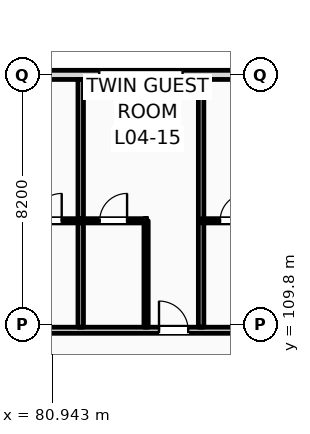
"""IFC4 building model, lengths in metres.
Left out: names, types, materials, properties, quantities, classifications, styles, units other than length and angle.
Written with IfcOpenShell. Run it as: python <this file> out.ifc"""

import sys

from ifc_helpers import new_model, si_unit, direction, frame, frame_2d, origin, place, context, subcontext, project, spatial, rectangle, extrude, element, fill, save


model = new_model("IFC4")
c1 = context("Model", 3, precision=1e-05, world=origin(), true_north=direction((0.0, 1.0)))
c2 = subcontext(c1, "Body", "Model", "MODEL_VIEW")
j1 = project(units=[si_unit("LENGTHUNIT", "METRE"), si_unit("PLANEANGLEUNIT", "RADIAN")], contexts=[c1])
p1 = place(None, origin())
s1 = spatial("IfcSite", under=j1, at=p1, CompositionType="ELEMENT")
p2 = place(p1, origin())
s2 = spatial("IfcBuilding", under=s1, at=p2, CompositionType="ELEMENT")
p3 = place(p2, frame((0.0, 0.0, 20.4)))
s3 = spatial("IfcBuildingStorey", under=s2, at=p3, CompositionType="ELEMENT", Elevation=20.4)
p4 = place(p3, frame((22.5, 118.0, 0.0), z_axis=(0.0, 0.0, 1.0), x_axis=(1.0, 0.0, 0.0)))
e1 = element("IfcWall", 1, at=p4, inside=s3, PredefinedType="STANDARD", context=c2, shape_type="SweptSolid", body=[
    extrude(rectangle(XDim=97.5, YDim=0.3, at=frame_2d((48.75, 0.0))), origin(), (0.0, 0.0, 1.0), 3.38),
])
p5 = place(p4, frame((0.91, 0.0, 0.9)))
e2 = element("IfcOpeningElement", 2, at=p5, cuts=e1, PredefinedType="OPENING", context=c2, shape_type="SweptSolid", body=[
    extrude(rectangle(XDim=0.9, YDim=1.8, at=frame_2d((0.45, 0.9))), frame((0.0, 0.16, 0.0), z_axis=(0.0, -1.0, 0.0), x_axis=(1.0, 0.0, 0.0)), (0.0, 0.0, 1.0), 0.32),
])
p6 = place(p4, frame((6.36, 0.0, 0.0)))
e3 = element("IfcOpeningElement", 3, at=p6, cuts=e1, PredefinedType="OPENING", context=c2, shape_type="SweptSolid", body=[
    extrude(rectangle(XDim=1.2, YDim=2.25, at=frame_2d((0.6, 1.125))), frame((0.0, 0.16, 0.0), z_axis=(0.0, -1.0, 0.0), x_axis=(1.0, 0.0, 0.0)), (0.0, 0.0, 1.0), 0.32),
])
p7 = place(p4, frame((11.41, 0.0, 0.9)))
e4 = element("IfcOpeningElement", 4, at=p7, cuts=e1, PredefinedType="OPENING", context=c2, shape_type="SweptSolid", body=[
    extrude(rectangle(XDim=1.1, YDim=1.9, at=frame_2d((0.55, 0.95))), frame((0.0, 0.16, 0.0), z_axis=(0.0, -1.0, 0.0), x_axis=(1.0, 0.0, 0.0)), (0.0, 0.0, 1.0), 0.32),
])
p8 = place(p4, frame((14.335, 0.0, 0.9)))
e5 = element("IfcOpeningElement", 5, at=p8, cuts=e1, PredefinedType="OPENING", context=c2, shape_type="SweptSolid", body=[
    extrude(rectangle(XDim=1.65, YDim=1.95, at=frame_2d((0.825, 0.975))), frame((0.0, 0.16, 0.0), z_axis=(0.0, -1.0, 0.0), x_axis=(1.0, 0.0, 0.0)), (0.0, 0.0, 1.0), 0.32),
])
p9 = place(p4, frame((19.26, 0.0, 0.9)))
e6 = element("IfcOpeningElement", 6, at=p9, cuts=e1, PredefinedType="OPENING", context=c2, shape_type="SweptSolid", body=[
    extrude(rectangle(XDim=1.35, YDim=2.0, at=frame_2d((0.675, 1.0))), frame((0.0, 0.16, 0.0), z_axis=(0.0, -1.0, 0.0), x_axis=(1.0, 0.0, 0.0)), (0.0, 0.0, 1.0), 0.32),
])
p10 = place(p4, frame((22.8, 0.0, 0.0)))
e7 = element("IfcOpeningElement", 7, at=p10, cuts=e1, PredefinedType="OPENING", context=c2, shape_type="SweptSolid", body=[
    extrude(rectangle(XDim=1.2, YDim=2.25, at=frame_2d((0.6, 1.125))), frame((0.0, 0.16, 0.0), z_axis=(0.0, -1.0, 0.0), x_axis=(1.0, 0.0, 0.0)), (0.0, 0.0, 1.0), 0.32),
])
p11 = place(p4, frame((26.91, 0.0, 0.9)))
e8 = element("IfcOpeningElement", 8, at=p11, cuts=e1, PredefinedType="OPENING", context=c2, shape_type="SweptSolid", body=[
    extrude(rectangle(XDim=2.1, YDim=2.1, at=frame_2d((1.05, 1.05))), frame((0.0, 0.16, 0.0), z_axis=(0.0, -1.0, 0.0), x_axis=(1.0, 0.0, 0.0)), (0.0, 0.0, 1.0), 0.32),
])
p12 = place(p4, frame((30.835, 0.0, 0.9)))
e9 = element("IfcOpeningElement", 9, at=p12, cuts=e1, PredefinedType="OPENING", context=c2, shape_type="SweptSolid", body=[
    extrude(rectangle(XDim=2.25, YDim=2.15, at=frame_2d((1.125, 1.075))), frame((0.0, 0.16, 0.0), z_axis=(0.0, -1.0, 0.0), x_axis=(1.0, 0.0, 0.0)), (0.0, 0.0, 1.0), 0.32),
])
p13 = place(p4, frame((34.96, 0.0, 0.9)))
e10 = element("IfcOpeningElement", 10, at=p13, cuts=e1, PredefinedType="OPENING", context=c2, shape_type="SweptSolid", body=[
    extrude(rectangle(XDim=2.4, YDim=2.2, at=frame_2d((1.2, 1.1))), frame((0.0, 0.16, 0.0), z_axis=(0.0, -1.0, 0.0), x_axis=(1.0, 0.0, 0.0)), (0.0, 0.0, 1.0), 0.32),
])
p14 = place(p4, frame((39.0, 0.0, 0.0)))
e11 = element("IfcOpeningElement", 11, at=p14, cuts=e1, PredefinedType="OPENING", context=c2, shape_type="SweptSolid", body=[
    extrude(rectangle(XDim=1.2, YDim=2.25, at=frame_2d((0.6, 1.125))), frame((0.0, 0.16, 0.0), z_axis=(0.0, -1.0, 0.0), x_axis=(1.0, 0.0, 0.0)), (0.0, 0.0, 1.0), 0.32),
])
p15 = place(p4, frame((43.21, 0.0, 0.9)))
e12 = element("IfcOpeningElement", 12, at=p15, cuts=e1, PredefinedType="OPENING", context=c2, shape_type="SweptSolid", body=[
    extrude(rectangle(XDim=2.7, YDim=2.3, at=frame_2d((1.35, 1.15))), frame((0.0, 0.16, 0.0), z_axis=(0.0, -1.0, 0.0), x_axis=(1.0, 0.0, 0.0)), (0.0, 0.0, 1.0), 0.32),
])
p16 = place(p4, frame((47.335, 0.0, 0.9)))
e13 = element("IfcOpeningElement", 13, at=p16, cuts=e1, PredefinedType="OPENING", context=c2, shape_type="SweptSolid", body=[
    extrude(rectangle(XDim=1.35, YDim=2.3, at=frame_2d((0.675, 1.15))), frame((0.0, 0.16, 0.0), z_axis=(0.0, -1.0, 0.0), x_axis=(1.0, 0.0, 0.0)), (0.0, 0.0, 1.0), 0.32),
])
p17 = place(p4, frame((52.74, 0.0, 0.0)))
e14 = element("IfcOpeningElement", 14, at=p17, cuts=e1, PredefinedType="OPENING", context=c2, shape_type="SweptSolid", body=[
    extrude(rectangle(XDim=1.2, YDim=2.25, at=frame_2d((0.6, 1.125))), frame((0.0, 0.16, 0.0), z_axis=(0.0, -1.0, 0.0), x_axis=(1.0, 0.0, 0.0)), (0.0, 0.0, 1.0), 0.32),
])
p18 = place(p4, frame((55.36, 0.0, 0.9)))
e15 = element("IfcOpeningElement", 15, at=p18, cuts=e1, PredefinedType="OPENING", context=c2, shape_type="SweptSolid", body=[
    extrude(rectangle(XDim=1.1, YDim=2.3, at=frame_2d((0.55, 1.15))), frame((0.0, 0.16, 0.0), z_axis=(0.0, -1.0, 0.0), x_axis=(1.0, 0.0, 0.0)), (0.0, 0.0, 1.0), 0.32),
])
p19 = place(p4, frame((59.99, 0.0, 0.9)))
e16 = element("IfcOpeningElement", 16, at=p19, cuts=e1, PredefinedType="OPENING", context=c2, shape_type="SweptSolid", body=[
    extrude(rectangle(XDim=2.74, YDim=2.3, at=frame_2d((1.37, 1.15))), frame((0.0, 0.16, 0.0), z_axis=(0.0, -1.0, 0.0), x_axis=(1.0, 0.0, 0.0)), (0.0, 0.0, 1.0), 0.32),
])
p20 = place(p4, frame((65.95, 0.0, 0.9)))
e17 = element("IfcOpeningElement", 17, at=p20, cuts=e1, PredefinedType="OPENING", context=c2, shape_type="SweptSolid", body=[
    extrude(rectangle(XDim=1.35, YDim=2.3, at=frame_2d((0.675, 1.15))), frame((0.0, 0.16, 0.0), z_axis=(0.0, -1.0, 0.0), x_axis=(1.0, 0.0, 0.0)), (0.0, 0.0, 1.0), 0.32),
])
p21 = place(p4, frame((69.16, 0.0, 0.0)))
e18 = element("IfcOpeningElement", 18, at=p21, cuts=e1, PredefinedType="OPENING", context=c2, shape_type="SweptSolid", body=[
    extrude(rectangle(XDim=1.2, YDim=2.25, at=frame_2d((0.6, 1.125))), frame((0.0, 0.16, 0.0), z_axis=(0.0, -1.0, 0.0), x_axis=(1.0, 0.0, 0.0)), (0.0, 0.0, 1.0), 0.32),
])
p22 = place(p4, frame((73.75, 0.0, 0.9)))
e19 = element("IfcOpeningElement", 19, at=p22, cuts=e1, PredefinedType="OPENING", context=c2, shape_type="SweptSolid", body=[
    extrude(rectangle(XDim=1.8, YDim=2.3, at=frame_2d((0.9, 1.15))), frame((0.0, 0.16, 0.0), z_axis=(0.0, -1.0, 0.0), x_axis=(1.0, 0.0, 0.0)), (0.0, 0.0, 1.0), 0.32),
])
p23 = place(p4, frame((76.79, 0.0, 0.9)))
e20 = element("IfcOpeningElement", 20, at=p23, cuts=e1, PredefinedType="OPENING", context=c2, shape_type="SweptSolid", body=[
    extrude(rectangle(XDim=2.74, YDim=2.3, at=frame_2d((1.37, 1.15))), frame((0.0, 0.16, 0.0), z_axis=(0.0, -1.0, 0.0), x_axis=(1.0, 0.0, 0.0)), (0.0, 0.0, 1.0), 0.32),
])
p24 = place(p4, frame((81.55, 0.0, 0.9)))
e21 = element("IfcOpeningElement", 21, at=p24, cuts=e1, PredefinedType="OPENING", context=c2, shape_type="SweptSolid", body=[
    extrude(rectangle(XDim=1.8, YDim=2.3, at=frame_2d((0.9, 1.15))), frame((0.0, 0.16, 0.0), z_axis=(0.0, -1.0, 0.0), x_axis=(1.0, 0.0, 0.0)), (0.0, 0.0, 1.0), 0.32),
])
p25 = place(p4, frame((86.01, 0.0, 0.9)))
e22 = element("IfcOpeningElement", 22, at=p25, cuts=e1, PredefinedType="OPENING", context=c2, shape_type="SweptSolid", body=[
    extrude(rectangle(XDim=1.1, YDim=1.5, at=frame_2d((0.55, 0.75))), frame((0.0, 0.16, 0.0), z_axis=(0.0, -1.0, 0.0), x_axis=(1.0, 0.0, 0.0)), (0.0, 0.0, 1.0), 0.32),
])
p26 = place(p4, frame((90.135, 0.0, 0.9)))
e23 = element("IfcOpeningElement", 23, at=p26, cuts=e1, PredefinedType="OPENING", context=c2, shape_type="SweptSolid", body=[
    extrude(rectangle(XDim=1.25, YDim=1.6, at=frame_2d((0.625, 0.8))), frame((0.0, 0.16, 0.0), z_axis=(0.0, -1.0, 0.0), x_axis=(1.0, 0.0, 0.0)), (0.0, 0.0, 1.0), 0.32),
])
p27 = place(p4, frame((94.34, 0.0, 0.9)))
e24 = element("IfcOpeningElement", 24, at=p27, cuts=e1, PredefinedType="OPENING", context=c2, shape_type="SweptSolid", body=[
    extrude(rectangle(XDim=1.4, YDim=1.7, at=frame_2d((0.7, 0.85))), frame((0.0, 0.16, 0.0), z_axis=(0.0, -1.0, 0.0), x_axis=(1.0, 0.0, 0.0)), (0.0, 0.0, 1.0), 0.32),
])
p28 = place(p3, frame((10.65, 109.6, 0.0), z_axis=(0.0, 0.0, 1.0), x_axis=(1.0, 0.0, 0.0)))
e25 = element("IfcWall", 25, at=p28, inside=s3, PredefinedType="PARTITIONING", context=c2, shape_type="SweptSolid", body=[
    extrude(rectangle(XDim=109.21, YDim=0.2, at=frame_2d((54.605, 0.0))), origin(), (0.0, 0.0, 1.0), 3.38),
])
p29 = place(p28, frame((12.535, 0.0, 0.0)))
e26 = element("IfcOpeningElement", 26, at=p29, cuts=e25, PredefinedType="OPENING", context=c2, shape_type="SweptSolid", body=[
    extrude(rectangle(XDim=1.02, YDim=2.2, at=frame_2d((0.51, 1.1))), frame((0.0, 0.11, 0.0), z_axis=(0.0, -1.0, 0.0), x_axis=(1.0, 0.0, 0.0)), (0.0, 0.0, 1.0), 0.22),
])
p30 = place(p28, frame((19.175, 0.0, 0.0)))
e27 = element("IfcOpeningElement", 27, at=p30, cuts=e25, PredefinedType="OPENING", context=c2, shape_type="SweptSolid", body=[
    extrude(rectangle(XDim=1.02, YDim=2.2, at=frame_2d((0.51, 1.1))), frame((0.0, 0.11, 0.0), z_axis=(0.0, -1.0, 0.0), x_axis=(1.0, 0.0, 0.0)), (0.0, 0.0, 1.0), 0.22),
])
p31 = place(p28, frame((23.375, 0.0, 0.0)))
e28 = element("IfcOpeningElement", 28, at=p31, cuts=e25, PredefinedType="OPENING", context=c2, shape_type="SweptSolid", body=[
    extrude(rectangle(XDim=1.02, YDim=2.2, at=frame_2d((0.51, 1.1))), frame((0.0, 0.11, 0.0), z_axis=(0.0, -1.0, 0.0), x_axis=(1.0, 0.0, 0.0)), (0.0, 0.0, 1.0), 0.22),
])
p32 = place(p28, frame((27.575, 0.0, 0.0)))
e29 = element("IfcOpeningElement", 29, at=p32, cuts=e25, PredefinedType="OPENING", context=c2, shape_type="SweptSolid", body=[
    extrude(rectangle(XDim=1.02, YDim=2.2, at=frame_2d((0.51, 1.1))), frame((0.0, 0.11, 0.0), z_axis=(0.0, -1.0, 0.0), x_axis=(1.0, 0.0, 0.0)), (0.0, 0.0, 1.0), 0.22),
])
p33 = place(p28, frame((31.805, 0.0, 0.0)))
e30 = element("IfcOpeningElement", 30, at=p33, cuts=e25, PredefinedType="OPENING", context=c2, shape_type="SweptSolid", body=[
    extrude(rectangle(XDim=0.96, YDim=2.2, at=frame_2d((0.48, 1.1))), frame((0.0, 0.11, 0.0), z_axis=(0.0, -1.0, 0.0), x_axis=(1.0, 0.0, 0.0)), (0.0, 0.0, 1.0), 0.22),
])
p34 = place(p28, frame((33.855, 0.0, 0.0)))
e31 = element("IfcOpeningElement", 31, at=p34, cuts=e25, PredefinedType="OPENING", context=c2, shape_type="SweptSolid", body=[
    extrude(rectangle(XDim=0.96, YDim=2.2, at=frame_2d((0.48, 1.1))), frame((0.0, 0.11, 0.0), z_axis=(0.0, -1.0, 0.0), x_axis=(1.0, 0.0, 0.0)), (0.0, 0.0, 1.0), 0.22),
])
p35 = place(p28, frame((40.205, 0.0, 0.0)))
e32 = element("IfcOpeningElement", 32, at=p35, cuts=e25, PredefinedType="OPENING", context=c2, shape_type="SweptSolid", body=[
    extrude(rectangle(XDim=0.96, YDim=2.2, at=frame_2d((0.48, 1.1))), frame((0.0, 0.11, 0.0), z_axis=(0.0, -1.0, 0.0), x_axis=(1.0, 0.0, 0.0)), (0.0, 0.0, 1.0), 0.22),
])
p36 = place(p28, frame((42.255, 0.0, 0.0)))
e33 = element("IfcOpeningElement", 33, at=p36, cuts=e25, PredefinedType="OPENING", context=c2, shape_type="SweptSolid", body=[
    extrude(rectangle(XDim=0.96, YDim=2.2, at=frame_2d((0.48, 1.1))), frame((0.0, 0.11, 0.0), z_axis=(0.0, -1.0, 0.0), x_axis=(1.0, 0.0, 0.0)), (0.0, 0.0, 1.0), 0.22),
])
p37 = place(p28, frame((48.605, 0.0, 0.0)))
e34 = element("IfcOpeningElement", 34, at=p37, cuts=e25, PredefinedType="OPENING", context=c2, shape_type="SweptSolid", body=[
    extrude(rectangle(XDim=0.96, YDim=2.2, at=frame_2d((0.48, 1.1))), frame((0.0, 0.11, 0.0), z_axis=(0.0, -1.0, 0.0), x_axis=(1.0, 0.0, 0.0)), (0.0, 0.0, 1.0), 0.22),
])
p38 = place(p28, frame((50.655, 0.0, 0.0)))
e35 = element("IfcOpeningElement", 35, at=p38, cuts=e25, PredefinedType="OPENING", context=c2, shape_type="SweptSolid", body=[
    extrude(rectangle(XDim=0.96, YDim=2.2, at=frame_2d((0.48, 1.1))), frame((0.0, 0.11, 0.0), z_axis=(0.0, -1.0, 0.0), x_axis=(1.0, 0.0, 0.0)), (0.0, 0.0, 1.0), 0.22),
])
p39 = place(p28, frame((57.005, 0.0, 0.0)))
e36 = element("IfcOpeningElement", 36, at=p39, cuts=e25, PredefinedType="OPENING", context=c2, shape_type="SweptSolid", body=[
    extrude(rectangle(XDim=0.96, YDim=2.2, at=frame_2d((0.48, 1.1))), frame((0.0, 0.11, 0.0), z_axis=(0.0, -1.0, 0.0), x_axis=(1.0, 0.0, 0.0)), (0.0, 0.0, 1.0), 0.22),
])
p40 = place(p28, frame((59.055, 0.0, 0.0)))
e37 = element("IfcOpeningElement", 37, at=p40, cuts=e25, PredefinedType="OPENING", context=c2, shape_type="SweptSolid", body=[
    extrude(rectangle(XDim=0.96, YDim=2.2, at=frame_2d((0.48, 1.1))), frame((0.0, 0.11, 0.0), z_axis=(0.0, -1.0, 0.0), x_axis=(1.0, 0.0, 0.0)), (0.0, 0.0, 1.0), 0.22),
])
p41 = place(p28, frame((65.405, 0.0, 0.0)))
e38 = element("IfcOpeningElement", 38, at=p41, cuts=e25, PredefinedType="OPENING", context=c2, shape_type="SweptSolid", body=[
    extrude(rectangle(XDim=0.96, YDim=2.2, at=frame_2d((0.48, 1.1))), frame((0.0, 0.11, 0.0), z_axis=(0.0, -1.0, 0.0), x_axis=(1.0, 0.0, 0.0)), (0.0, 0.0, 1.0), 0.22),
])
p42 = place(p28, frame((67.205, 0.0, 0.0)))
e39 = element("IfcOpeningElement", 39, at=p42, cuts=e25, PredefinedType="OPENING", context=c2, shape_type="SweptSolid", body=[
    extrude(rectangle(XDim=0.96, YDim=2.2, at=frame_2d((0.48, 1.1))), frame((0.0, 0.11, 0.0), z_axis=(0.0, -1.0, 0.0), x_axis=(1.0, 0.0, 0.0)), (0.0, 0.0, 1.0), 0.22),
])
p43 = place(p28, frame((73.805, 0.0, 0.0)))
e40 = element("IfcOpeningElement", 40, at=p43, cuts=e25, PredefinedType="OPENING", context=c2, shape_type="SweptSolid", body=[
    extrude(rectangle(XDim=0.96, YDim=2.2, at=frame_2d((0.48, 1.1))), frame((0.0, 0.11, 0.0), z_axis=(0.0, -1.0, 0.0), x_axis=(1.0, 0.0, 0.0)), (0.0, 0.0, 1.0), 0.22),
])
p44 = place(p28, frame((78.255, 0.0, 0.0)))
e41 = element("IfcOpeningElement", 41, at=p44, cuts=e25, PredefinedType="OPENING", context=c2, shape_type="SweptSolid", body=[
    extrude(rectangle(XDim=0.96, YDim=2.2, at=frame_2d((0.48, 1.1))), frame((0.0, 0.11, 0.0), z_axis=(0.0, -1.0, 0.0), x_axis=(1.0, 0.0, 0.0)), (0.0, 0.0, 1.0), 0.22),
])
p45 = place(p28, frame((82.205, 0.0, 0.0)))
e42 = element("IfcOpeningElement", 42, at=p45, cuts=e25, PredefinedType="OPENING", context=c2, shape_type="SweptSolid", body=[
    extrude(rectangle(XDim=0.96, YDim=2.2, at=frame_2d((0.48, 1.1))), frame((0.0, 0.11, 0.0), z_axis=(0.0, -1.0, 0.0), x_axis=(1.0, 0.0, 0.0)), (0.0, 0.0, 1.0), 0.22),
])
p46 = place(p28, frame((86.405, 0.0, 0.0)))
e43 = element("IfcOpeningElement", 43, at=p46, cuts=e25, PredefinedType="OPENING", context=c2, shape_type="SweptSolid", body=[
    extrude(rectangle(XDim=0.96, YDim=2.2, at=frame_2d((0.48, 1.1))), frame((0.0, 0.11, 0.0), z_axis=(0.0, -1.0, 0.0), x_axis=(1.0, 0.0, 0.0)), (0.0, 0.0, 1.0), 0.22),
])
p47 = place(p28, frame((90.605, 0.0, 0.0)))
e44 = element("IfcOpeningElement", 44, at=p47, cuts=e25, PredefinedType="OPENING", context=c2, shape_type="SweptSolid", body=[
    extrude(rectangle(XDim=0.96, YDim=2.2, at=frame_2d((0.48, 1.1))), frame((0.0, 0.11, 0.0), z_axis=(0.0, -1.0, 0.0), x_axis=(1.0, 0.0, 0.0)), (0.0, 0.0, 1.0), 0.22),
])
p48 = place(p28, frame((94.805, 0.0, 0.0)))
e45 = element("IfcOpeningElement", 45, at=p48, cuts=e25, PredefinedType="OPENING", context=c2, shape_type="SweptSolid", body=[
    extrude(rectangle(XDim=0.96, YDim=2.2, at=frame_2d((0.48, 1.1))), frame((0.0, 0.11, 0.0), z_axis=(0.0, -1.0, 0.0), x_axis=(1.0, 0.0, 0.0)), (0.0, 0.0, 1.0), 0.22),
])
p49 = place(p28, frame((99.005, 0.0, 0.0)))
e46 = element("IfcOpeningElement", 46, at=p49, cuts=e25, PredefinedType="OPENING", context=c2, shape_type="SweptSolid", body=[
    extrude(rectangle(XDim=0.96, YDim=2.2, at=frame_2d((0.48, 1.1))), frame((0.0, 0.11, 0.0), z_axis=(0.0, -1.0, 0.0), x_axis=(1.0, 0.0, 0.0)), (0.0, 0.0, 1.0), 0.22),
])
p50 = place(p28, frame((103.205, 0.0, 0.0)))
e47 = element("IfcOpeningElement", 47, at=p50, cuts=e25, PredefinedType="OPENING", context=c2, shape_type="SweptSolid", body=[
    extrude(rectangle(XDim=0.96, YDim=2.2, at=frame_2d((0.48, 1.1))), frame((0.0, 0.11, 0.0), z_axis=(0.0, -1.0, 0.0), x_axis=(1.0, 0.0, 0.0)), (0.0, 0.0, 1.0), 0.22),
])
p51 = place(p28, frame((105.335, 0.0, 0.0)))
e48 = element("IfcOpeningElement", 48, at=p51, cuts=e25, PredefinedType="OPENING", context=c2, shape_type="SweptSolid", body=[
    extrude(rectangle(XDim=0.96, YDim=2.2, at=frame_2d((0.48, 1.1))), frame((0.0, 0.11, 0.0), z_axis=(0.0, -1.0, 0.0), x_axis=(1.0, 0.0, 0.0)), (0.0, 0.0, 1.0), 0.22),
])
p52 = place(p28, frame((2.716, 0.0, 0.0)))
e49 = element("IfcOpeningElement", 49, at=p52, cuts=e25, PredefinedType="OPENING", context=c2, shape_type="SweptSolid", body=[
    extrude(rectangle(XDim=1.35, YDim=2.25, at=frame_2d((0.675, 1.125))), frame((0.0, 0.11, 0.0), z_axis=(0.0, -1.0, 0.0), x_axis=(1.0, 0.0, 0.0)), (0.0, 0.0, 1.0), 0.22),
])
p53 = place(p28, frame((6.65, 0.0, 0.0)))
e50 = element("IfcOpeningElement", 50, at=p53, cuts=e25, PredefinedType="OPENING", context=c2, shape_type="SweptSolid", body=[
    extrude(rectangle(XDim=1.35, YDim=2.25, at=frame_2d((0.675, 1.125))), frame((0.0, 0.11, 0.0), z_axis=(0.0, -1.0, 0.0), x_axis=(1.0, 0.0, 0.0)), (0.0, 0.0, 1.0), 0.22),
])
p54 = place(p28, frame((10.583, 0.0, 0.0)))
e51 = element("IfcOpeningElement", 51, at=p54, cuts=e25, PredefinedType="OPENING", context=c2, shape_type="SweptSolid", body=[
    extrude(rectangle(XDim=1.35, YDim=2.25, at=frame_2d((0.675, 1.125))), frame((0.0, 0.11, 0.0), z_axis=(0.0, -1.0, 0.0), x_axis=(1.0, 0.0, 0.0)), (0.0, 0.0, 1.0), 0.22),
])
p55 = place(p3, frame((81.88, 109.7, 0.0), z_axis=(0.0, 0.0, 1.0), x_axis=(0.0, 1.0, 0.0)))
e52 = element("IfcWall", 52, at=p55, inside=s3, PredefinedType="PARTITIONING", context=c2, shape_type="SweptSolid", body=[
    extrude(rectangle(XDim=8.15, YDim=0.18, at=frame_2d((4.075, 0.0))), origin(), (0.0, 0.0, 1.0), 3.94),
])
p56 = place(p3, frame((79.73, 113.2, 0.0), z_axis=(0.0, 0.0, 1.0), x_axis=(1.0, 0.0, 0.0)))
e53 = element("IfcWall", 53, at=p56, inside=s3, PredefinedType="PARTITIONING", context=c2, shape_type="SweptSolid", body=[
    extrude(rectangle(XDim=2.15, YDim=0.14, at=frame_2d((1.075, 0.0))), origin(), (0.0, 0.0, 1.0), 3.94),
])
p57 = place(p56, frame((0.625, 0.0, 0.0)))
e54 = element("IfcOpeningElement", 54, at=p57, cuts=e53, PredefinedType="OPENING", context=c2, shape_type="SweptSolid", body=[
    extrude(rectangle(XDim=0.9, YDim=2.1, at=frame_2d((0.45, 1.05))), frame((0.0, 0.08, 0.0), z_axis=(0.0, -1.0, 0.0), x_axis=(1.0, 0.0, 0.0)), (0.0, 0.0, 1.0), 0.16),
])
p58 = place(p3, frame((85.84, 109.7, 0.0), z_axis=(0.0, 0.0, 1.0), x_axis=(0.0, 1.0, 0.0)))
e55 = element("IfcWall", 55, at=p58, inside=s3, PredefinedType="PARTITIONING", context=c2, shape_type="SweptSolid", body=[
    extrude(rectangle(XDim=8.15, YDim=0.18, at=frame_2d((4.075, 0.0))), origin(), (0.0, 0.0, 1.0), 3.94),
])
p59 = place(p3, frame((84.03, 109.7, 0.0), z_axis=(0.0, 0.0, 1.0), x_axis=(0.0, 1.0, 0.0)))
e56 = element("IfcWall", 56, at=p59, inside=s3, PredefinedType="PARTITIONING", context=c2, shape_type="SweptSolid", body=[
    extrude(rectangle(XDim=3.5, YDim=0.14, at=frame_2d((1.75, 0.0))), origin(), (0.0, 0.0, 1.0), 3.94),
])
p60 = place(p3, frame((81.88, 113.2, 0.0), z_axis=(0.0, 0.0, 1.0), x_axis=(1.0, 0.0, 0.0)))
e57 = element("IfcWall", 57, at=p60, inside=s3, PredefinedType="PARTITIONING", context=c2, shape_type="SweptSolid", body=[
    extrude(rectangle(XDim=2.15, YDim=0.14, at=frame_2d((1.075, 0.0))), origin(), (0.0, 0.0, 1.0), 3.94),
])
p61 = place(p60, frame((0.625, 0.0, 0.0)))
e58 = element("IfcOpeningElement", 58, at=p61, cuts=e57, PredefinedType="OPENING", context=c2, shape_type="SweptSolid", body=[
    extrude(rectangle(XDim=0.9, YDim=2.1, at=frame_2d((0.45, 1.05))), frame((0.0, 0.08, 0.0), z_axis=(0.0, -1.0, 0.0), x_axis=(1.0, 0.0, 0.0)), (0.0, 0.0, 1.0), 0.16),
])
p62 = place(p3, frame((85.84, 113.2, 0.0), z_axis=(0.0, 0.0, 1.0), x_axis=(1.0, 0.0, 0.0)))
e59 = element("IfcWall", 59, at=p62, inside=s3, PredefinedType="PARTITIONING", context=c2, shape_type="SweptSolid", body=[
    extrude(rectangle(XDim=2.15, YDim=0.14, at=frame_2d((1.075, 0.0))), origin(), (0.0, 0.0, 1.0), 3.94),
])
p63 = place(p62, frame((0.625, 0.0, 0.0)))
e60 = element("IfcOpeningElement", 60, at=p63, cuts=e59, PredefinedType="OPENING", context=c2, shape_type="SweptSolid", body=[
    extrude(rectangle(XDim=0.9, YDim=2.1, at=frame_2d((0.45, 1.05))), frame((0.0, 0.08, 0.0), z_axis=(0.0, -1.0, 0.0), x_axis=(1.0, 0.0, 0.0)), (0.0, 0.0, 1.0), 0.16),
])
p64 = place(p19, origin())
e61 = element("IfcWindow", 61, at=p64, inside=s3, PartitioningType="DOUBLE_PANEL_VERTICAL", PredefinedType="WINDOW", context=c2, shape_type="SweptSolid", body=[
    extrude(rectangle(XDim=2.74, YDim=2.3, at=frame_2d((1.37, 1.15))), frame((0.0, 0.03, 0.0), z_axis=(0.0, -1.0, 0.0), x_axis=(1.0, 0.0, 0.0)), (0.0, 0.0, 1.0), 0.06),
])
fill(e16, e61)
p65 = place(p57, origin())
e62 = element("IfcDoor", 62, at=p65, inside=s3, OperationType="SINGLE_SWING_RIGHT", PredefinedType="DOOR", context=c2, shape_type="SweptSolid", body=[
    extrude(rectangle(XDim=0.9, YDim=2.1, at=frame_2d((0.45, 1.05))), frame((0.0, 0.025, 0.0), z_axis=(0.0, -1.0, 0.0), x_axis=(1.0, 0.0, 0.0)), (0.0, 0.0, 1.0), 0.05),
])
fill(e54, e62)
p66 = place(p43, origin())
e63 = element("IfcDoor", 63, at=p66, inside=s3, OperationType="SINGLE_SWING_LEFT", PredefinedType="DOOR", context=c2, shape_type="SweptSolid", body=[
    extrude(rectangle(XDim=0.96, YDim=2.2, at=frame_2d((0.48, 1.1))), frame((0.0, 0.025, 0.0), z_axis=(0.0, -1.0, 0.0), x_axis=(1.0, 0.0, 0.0)), (0.0, 0.0, 1.0), 0.05),
])
fill(e40, e63)
p67 = place(p61, origin())
e64 = element("IfcDoor", 64, at=p67, inside=s3, OperationType="SINGLE_SWING_RIGHT", PredefinedType="DOOR", context=c2, shape_type="SweptSolid", body=[
    extrude(rectangle(XDim=0.9, YDim=2.1, at=frame_2d((0.45, 1.05))), frame((0.0, 0.025, 0.0), z_axis=(0.0, -1.0, 0.0), x_axis=(1.0, 0.0, 0.0)), (0.0, 0.0, 1.0), 0.05),
])
fill(e58, e64)
p68 = place(p63, origin())
e65 = element("IfcDoor", 65, at=p68, inside=s3, OperationType="SINGLE_SWING_RIGHT", PredefinedType="DOOR", context=c2, shape_type="SweptSolid", body=[
    extrude(rectangle(XDim=0.9, YDim=2.1, at=frame_2d((0.45, 1.05))), frame((0.0, 0.025, 0.0), z_axis=(0.0, -1.0, 0.0), x_axis=(1.0, 0.0, 0.0)), (0.0, 0.0, 1.0), 0.05),
])
fill(e60, e65)
save(model, sys.argv[1])
